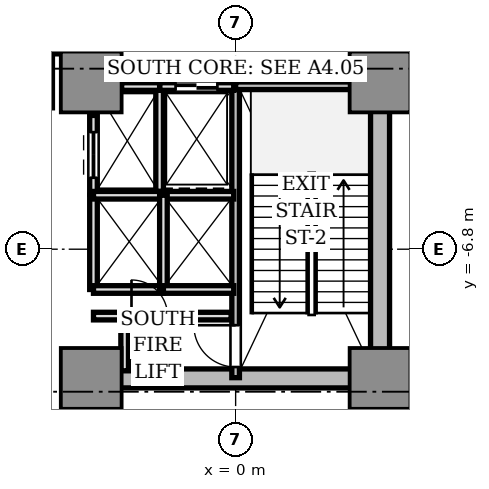
"""IFC4 building model, lengths in metres.
Left out: names, types, materials, properties, quantities, classifications, styles, units other than length and angle.
Written with IfcOpenShell. Run it as: python <this file> out.ifc"""

import sys

from ifc_helpers import new_model, si_unit, direction, frame, frame_2d, origin, origin_2d, place, context, subcontext, project, spatial, rectangle, extrude, source, transform, mapped, element, fill, save


model = new_model("IFC4")
c1 = context("Model", 3, precision=1e-05, world=origin(), true_north=direction((0.0, 1.0)))
c2 = subcontext(c1, "Body", "Model", "MODEL_VIEW")
j1 = project(units=[si_unit("LENGTHUNIT", "METRE"), si_unit("PLANEANGLEUNIT", "RADIAN")], contexts=[c1])
p1 = place(None, origin())
s1 = spatial("IfcSite", under=j1, at=p1, CompositionType="ELEMENT")
p2 = place(p1, origin())
s2 = spatial("IfcBuilding", under=s1, at=p2, CompositionType="ELEMENT")
p3 = place(p2, frame((0.0, 0.0, 9.3)))
s3 = spatial("IfcBuildingStorey", under=s2, at=p3, CompositionType="ELEMENT", Elevation=9.3)
p4 = place(p3, frame((-3.55, -10.2, 0.0), z_axis=(0.0, 0.0, 1.0), x_axis=(1.0, 0.0, 0.0)))
e1 = element("IfcWall", 1, at=p4, inside=s3, PredefinedType="SHEAR", context=c2, shape_type="SweptSolid", body=[
    extrude(rectangle(XDim=7.1, YDim=0.5, at=frame_2d((3.55, 0.0))), origin(), (0.0, 0.0, 1.0), 4.4),
])
p5 = place(p3, frame((3.8, -9.75, 0.0), z_axis=(0.0, 0.0, 1.0), x_axis=(0.0, 1.0, 0.0)))
e2 = element("IfcWall", 2, at=p5, inside=s3, PredefinedType="SHEAR", context=c2, shape_type="SweptSolid", body=[
    extrude(rectangle(XDim=6.9, YDim=0.5, at=frame_2d((3.45, 0.0))), origin(), (0.0, 0.0, 1.0), 4.4),
])
m1 = source(origin(), c2, "Body", "SweptSolid", [
    extrude(rectangle(XDim=1.6, YDim=1.6, at=origin_2d()), origin(), (0.0, 0.0, 1.0), 4.4),
])
for number, where, z_axis, x_axis in (
    (3, (-3.8, -2.4, 0.0), (0.0, 0.0, 1.0), (1.0, 0.0, 0.0)),
    (4, (3.8, -2.4, 0.0), (0.0, 0.0, 1.0), (1.0, 0.0, 0.0)),
    (5, (-3.8, -10.2, 0.0), (0.0, 0.0, 1.0), (1.0, 0.0, 0.0)),
    (6, (3.8, -10.2, 0.0), (0.0, 0.0, 1.0), (1.0, 0.0, 0.0)),
):
    element("IfcColumn", number, at=place(p3, frame(where, z_axis=z_axis, x_axis=x_axis)), inside=s3, PredefinedType="COLUMN", context=c2, shape_type="MappedRepresentation", body=[
        mapped(m1, transform((0.0, 0.0, 0.0), scale=1.0)),
    ])
m2 = source(origin(), c2, "Body", "SweptSolid", [
    extrude(rectangle(XDim=1.4, YDim=1.4, at=origin_2d()), origin(), (0.0, 0.0, 1.0), 4.4),
])
p6 = place(p3, frame((-5.5, -2.4, 0.0), z_axis=(0.0, 0.0, 1.0), x_axis=(1.0, 0.0, 0.0)))
e7 = element("IfcColumn", 7, at=p6, inside=s3, PredefinedType="COLUMN", context=c2, shape_type="MappedRepresentation", body=[
    mapped(m2, transform((0.0, 0.0, 0.0), scale=1.0)),
])
p7 = place(p3, frame((0.0, -10.18, 0.0), z_axis=(0.0, 0.0, 1.0), x_axis=(0.0, 1.0, 0.0)))
e8 = element("IfcWall", 8, at=p7, inside=s3, PredefinedType="SOLIDWALL", context=c2, shape_type="SweptSolid", body=[
    extrude(rectangle(XDim=7.68, YDim=0.2, at=frame_2d((3.84, 0.0))), origin(), (0.0, 0.0, 1.0), 4.4),
])
p8 = place(p7, frame((0.28, 0.0, 0.0)))
e9 = element("IfcOpeningElement", 9, at=p8, cuts=e8, PredefinedType="OPENING", context=c2, shape_type="SweptSolid", body=[
    extrude(rectangle(XDim=1.1, YDim=2.15, at=frame_2d((0.55, 1.075))), frame((0.0, 0.11, 0.0), z_axis=(0.0, -1.0, 0.0), x_axis=(1.0, 0.0, 0.0)), (0.0, 0.0, 1.0), 0.22),
])
p9 = place(p3, frame((0.0, -2.5, 0.0), z_axis=(0.0, 0.0, 1.0), x_axis=(1.0, 0.0, 0.0)))
e10 = element("IfcWall", 10, at=p9, inside=s3, PredefinedType="SOLIDWALL", context=c2, shape_type="SweptSolid", body=[
    extrude(rectangle(XDim=3.72, YDim=0.2, at=frame_2d((1.86, 0.0))), origin(), (0.0, 0.0, 1.0), 4.4),
])
p10 = place(p3, frame((-2.0, -5.28, 0.0), z_axis=(0.0, 0.0, 1.0), x_axis=(0.0, 1.0, 0.0)))
e11 = element("IfcWall", 11, at=p10, inside=s3, PredefinedType="SOLIDWALL", context=c2, shape_type="SweptSolid", body=[
    extrude(rectangle(XDim=2.78, YDim=0.2, at=frame_2d((1.39, 0.0))), origin(), (0.0, 0.0, 1.0), 3.95),
])
p11 = place(p3, frame((-2.0, -2.52, 0.0), z_axis=(0.0, 0.0, 1.0), x_axis=(1.0, 0.0, 0.0)))
e12 = element("IfcWall", 12, at=p11, inside=s3, PredefinedType="SOLIDWALL", context=c2, shape_type="SweptSolid", body=[
    extrude(rectangle(XDim=1.95, YDim=0.2, at=frame_2d((0.975, 0.0))), origin(), (0.0, 0.0, 1.0), 3.95),
])
p12 = place(p11, frame((0.42, 0.0, 0.0)))
e13 = element("IfcOpeningElement", 13, at=p12, cuts=e12, PredefinedType="OPENING", context=c2, shape_type="SweptSolid", body=[
    extrude(rectangle(XDim=1.1, YDim=2.2, at=frame_2d((0.55, 1.1))), frame((0.0, 0.11, 0.0), z_axis=(0.0, -1.0, 0.0), x_axis=(1.0, 0.0, 0.0)), (0.0, 0.0, 1.0), 0.22),
])
p13 = place(p3, frame((-3.0, -2.52, 0.0), z_axis=(0.0, 0.0, 1.0), x_axis=(1.0, 0.0, 0.0)))
e14 = element("IfcWall", 14, at=p13, inside=s3, PredefinedType="SOLIDWALL", context=c2, shape_type="SweptSolid", body=[
    extrude(rectangle(XDim=1.0, YDim=0.2, at=frame_2d((0.5, 0.0))), origin(), (0.0, 0.0, 1.0), 3.95),
])
p14 = place(p3, frame((-3.74, -5.36, 0.0), z_axis=(0.0, 0.0, 1.0), x_axis=(0.0, 1.0, 0.0)))
e15 = element("IfcWall", 15, at=p14, inside=s3, PredefinedType="SOLIDWALL", context=c2, shape_type="SweptSolid", body=[
    extrude(rectangle(XDim=2.08, YDim=0.2, at=frame_2d((1.04, 0.0))), origin(), (0.0, 0.0, 1.0), 3.95),
])
p15 = place(p14, frame((0.44, 0.0, 0.0)))
e16 = element("IfcOpeningElement", 16, at=p15, cuts=e15, PredefinedType="OPENING", context=c2, shape_type="SweptSolid", body=[
    extrude(rectangle(XDim=1.2, YDim=2.2, at=frame_2d((0.6, 1.1))), frame((0.0, 0.11, 0.0), z_axis=(0.0, -1.0, 0.0), x_axis=(1.0, 0.0, 0.0)), (0.0, 0.0, 1.0), 0.22),
])
p16 = place(p3, frame((-3.74, -7.86, 0.0), z_axis=(0.0, 0.0, 1.0), x_axis=(0.0, 1.0, 0.0)))
e17 = element("IfcWall", 17, at=p16, inside=s3, PredefinedType="SOLIDWALL", context=c2, shape_type="SweptSolid", body=[
    extrude(rectangle(XDim=2.48, YDim=0.2, at=frame_2d((1.24, 0.0))), origin(), (0.0, 0.0, 1.0), 3.95),
])
p17 = place(p3, frame((-3.74, -7.86, 0.0), z_axis=(0.0, 0.0, 1.0), x_axis=(1.0, 0.0, 0.0)))
e18 = element("IfcWall", 18, at=p17, inside=s3, PredefinedType="SOLIDWALL", context=c2, shape_type="SweptSolid", body=[
    extrude(rectangle(XDim=1.84, YDim=0.2, at=frame_2d((0.92, 0.0))), origin(), (0.0, 0.0, 1.0), 3.95),
])
p18 = place(p3, frame((-3.74, -5.38, 0.0), z_axis=(0.0, 0.0, 1.0), x_axis=(1.0, 0.0, 0.0)))
e19 = element("IfcWall", 19, at=p18, inside=s3, PredefinedType="SOLIDWALL", context=c2, shape_type="SweptSolid", body=[
    extrude(rectangle(XDim=3.69, YDim=0.2, at=frame_2d((1.845, 0.0))), origin(), (0.0, 0.0, 1.0), 3.95),
])
p19 = place(p3, frame((-1.9, -7.86, 0.0), z_axis=(0.0, 0.0, 1.0), x_axis=(0.0, 1.0, 0.0)))
e20 = element("IfcWall", 20, at=p19, inside=s3, PredefinedType="SOLIDWALL", context=c2, shape_type="SweptSolid", body=[
    extrude(rectangle(XDim=2.48, YDim=0.2, at=frame_2d((1.24, 0.0))), origin(), (0.0, 0.0, 1.0), 3.95),
])
p20 = place(p3, frame((-1.9, -7.86, 0.0), z_axis=(0.0, 0.0, 1.0), x_axis=(1.0, 0.0, 0.0)))
e21 = element("IfcWall", 21, at=p20, inside=s3, PredefinedType="SOLIDWALL", context=c2, shape_type="SweptSolid", body=[
    extrude(rectangle(XDim=1.85, YDim=0.2, at=frame_2d((0.925, 0.0))), origin(), (0.0, 0.0, 1.0), 3.95),
])
for number, where, z_axis, x_axis in (
    (22, (3.98, -1.56, 0.0), (0.0, 0.0, 1.0), (1.0, 0.0, 0.0)),
    (23, (-5.62, -1.56, 0.0), (0.0, 0.0, 1.0), (1.0, 0.0, 0.0)),
):
    element("IfcWall", number, at=place(p3, frame(where, z_axis=z_axis, x_axis=x_axis)), inside=s3, PredefinedType="SOLIDWALL", context=c2, shape_type="SweptSolid", body=[
        extrude(rectangle(XDim=1.64, YDim=0.2, at=frame_2d((0.82, 0.0))), origin(), (0.0, 0.0, 1.0), 3.95),
    ])
p21 = place(p3, frame((-3.74, -8.56, 0.0), z_axis=(0.0, 0.0, 1.0), x_axis=(1.0, 0.0, 0.0)))
e24 = element("IfcWall", 24, at=p21, inside=s3, PredefinedType="SOLIDWALL", context=c2, shape_type="SweptSolid", body=[
    extrude(rectangle(XDim=3.62, YDim=0.2, at=frame_2d((1.81, 0.0))), origin(), (0.0, 0.0, 1.0), 3.95),
])
p22 = place(p21, frame((1.0, 0.0, 0.0)))
e25 = element("IfcOpeningElement", 25, at=p22, cuts=e24, PredefinedType="OPENING", context=c2, shape_type="SweptSolid", body=[
    extrude(rectangle(XDim=0.95, YDim=2.15, at=frame_2d((0.475, 1.075))), frame((0.0, 0.11, 0.0), z_axis=(0.0, -1.0, 0.0), x_axis=(1.0, 0.0, 0.0)), (0.0, 0.0, 1.0), 0.22),
])
p23 = place(p3, frame((-2.92, -10.0, 0.0), z_axis=(0.0, 0.0, 1.0), x_axis=(0.0, 1.0, 0.0)))
e26 = element("IfcWall", 26, at=p23, inside=s3, PredefinedType="SOLIDWALL", context=c2, shape_type="SweptSolid", body=[
    extrude(rectangle(XDim=1.44, YDim=0.2, at=frame_2d((0.72, 0.0))), origin(), (0.0, 0.0, 1.0), 3.95),
])
m3 = source(origin(), c2, "Body", "SweptSolid", [
    extrude(rectangle(XDim=1.1, YDim=0.05, at=origin_2d()), origin(), (0.0, 0.0, 1.0), 2.2),
])
p24 = place(p12, frame((0.55, 0.0, 0.0)))
e27 = element("IfcDoor", 27, at=p24, inside=s3, OperationType="DOUBLE_DOOR_SLIDING", PredefinedType="DOOR", context=c2, shape_type="MappedRepresentation", body=[
    mapped(m3, transform((0.0, 0.0, 0.0), scale=1.0)),
])
fill(e13, e27)
m4 = source(origin(), c2, "Body", "SweptSolid", [
    extrude(rectangle(XDim=1.2, YDim=0.05, at=origin_2d()), origin(), (0.0, 0.0, 1.0), 2.2),
])
p25 = place(p15, frame((0.6, 0.0, 0.0)))
e28 = element("IfcDoor", 28, at=p25, inside=s3, OperationType="DOUBLE_DOOR_SLIDING", PredefinedType="DOOR", context=c2, shape_type="MappedRepresentation", body=[
    mapped(m4, transform((0.0, 0.0, 0.0), scale=1.0)),
])
fill(e16, e28)
m5 = source(origin(), c2, "Body", "SweptSolid", [
    extrude(rectangle(XDim=1.1, YDim=0.05, at=origin_2d()), origin(), (0.0, 0.0, 1.0), 2.15),
])
p26 = place(p8, frame((0.55, 0.0, 0.0)))
e29 = element("IfcDoor", 29, at=p26, inside=s3, OperationType="SINGLE_SWING_RIGHT", PredefinedType="DOOR", context=c2, shape_type="MappedRepresentation", body=[
    mapped(m5, transform((0.0, 0.0, 0.0), scale=1.0)),
])
fill(e9, e29)
m6 = source(origin(), c2, "Body", "SweptSolid", [
    extrude(rectangle(XDim=0.95, YDim=0.05, at=origin_2d()), origin(), (0.0, 0.0, 1.0), 2.15),
])
p27 = place(p22, frame((0.475, 0.0, 0.0)))
e30 = element("IfcDoor", 30, at=p27, inside=s3, OperationType="SINGLE_SWING_LEFT", PredefinedType="DOOR", context=c2, shape_type="MappedRepresentation", body=[
    mapped(m6, transform((0.0, 0.0, 0.0), scale=1.0)),
])
fill(e25, e30)
save(model, sys.argv[1])
